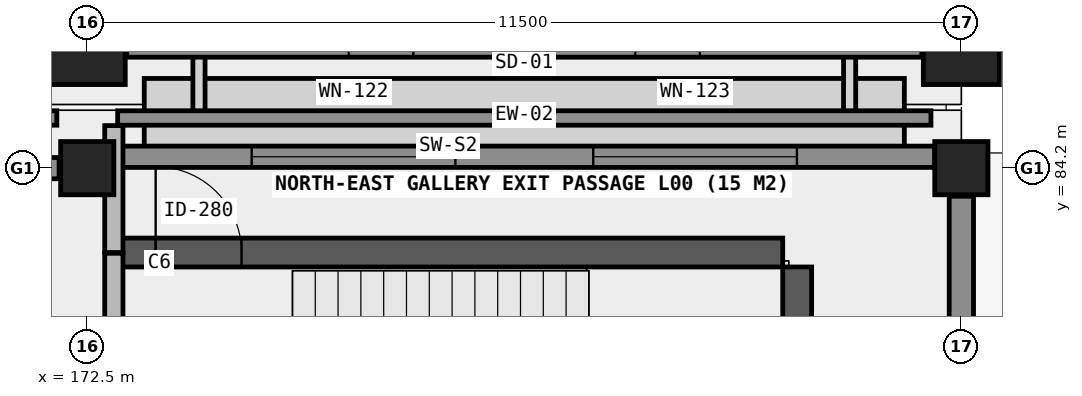
"""IFC4 building model, lengths in metres.
Left out: names, types, materials, properties, quantities, classifications, styles, units other than length and angle.
Written with IfcOpenShell. Run it as: python <this file> out.ifc"""

import sys

from ifc_helpers import new_model, si_unit, direction, frame, frame_2d, origin, origin_2d, place, context, subcontext, project, spatial, rectangle, extrude, element, fill, save


model = new_model("IFC4")
c1 = context("Model", 3, precision=1e-05, world=origin(), true_north=direction((0.0, 1.0)))
c2 = subcontext(c1, "Body", "Model", "MODEL_VIEW")
j1 = project(units=[si_unit("LENGTHUNIT", "METRE"), si_unit("PLANEANGLEUNIT", "RADIAN")], contexts=[c1])
p1 = place(None, origin())
s1 = spatial("IfcSite", under=j1, at=p1, CompositionType="ELEMENT")
p2 = place(p1, origin())
s2 = spatial("IfcBuilding", under=s1, at=p2, CompositionType="ELEMENT")
p3 = place(p2, origin())
s3 = spatial("IfcBuildingStorey", under=s2, at=p3, CompositionType="ELEMENT", Elevation=0.0)
p4 = place(p3, frame((172.5, 84.2, 0.0), z_axis=(0.0, 0.0, 1.0), x_axis=(1.0, 0.0, 0.0)))
e1 = element("IfcColumn", 1, at=p4, inside=s3, PredefinedType="COLUMN", context=c2, shape_type="SweptSolid", body=[
    extrude(rectangle(XDim=0.7, YDim=0.7, at=origin_2d()), origin(), (0.0, 0.0, 1.0), 4.2),
])
p5 = place(p3, frame((172.5, 85.8, 0.0), z_axis=(0.0, 0.0, 1.0), x_axis=(1.0, 0.0, 0.0)))
e2 = element("IfcColumn", 2, at=p5, inside=s3, PredefinedType="COLUMN", context=c2, shape_type="SweptSolid", body=[
    extrude(rectangle(XDim=1.0, YDim=1.0, at=origin_2d()), origin(), (0.0, 0.0, 1.0), 4.2),
])
p6 = place(p3, frame((184.0, 84.2, 0.0), z_axis=(0.0, 0.0, 1.0), x_axis=(1.0, 0.0, 0.0)))
e3 = element("IfcColumn", 3, at=p6, inside=s3, PredefinedType="COLUMN", context=c2, shape_type="SweptSolid", body=[
    extrude(rectangle(XDim=0.7, YDim=0.7, at=origin_2d()), origin(), (0.0, 0.0, 1.0), 4.2),
])
p7 = place(p3, frame((184.0, 85.8, 0.0), z_axis=(0.0, 0.0, 1.0), x_axis=(1.0, 0.0, 0.0)))
e4 = element("IfcColumn", 4, at=p7, inside=s3, PredefinedType="COLUMN", context=c2, shape_type="SweptSolid", body=[
    extrude(rectangle(XDim=1.0, YDim=1.0, at=origin_2d()), origin(), (0.0, 0.0, 1.0), 4.2),
])
p8 = place(p3, frame((172.85, 83.09, 0.0), z_axis=(0.0, 0.0, 1.0), x_axis=(1.0, 0.0, 0.0)))
e5 = element("IfcWall", 5, at=p8, inside=s3, PredefinedType="SHEAR", context=c2, shape_type="SweptSolid", body=[
    extrude(rectangle(XDim=8.8, YDim=0.38, at=frame_2d((4.4, 0.0))), origin(), (0.0, 0.0, 1.0), 4.2),
])
p9 = place(p8, frame((0.55, 0.0, 0.0)))
e6 = element("IfcOpeningElement", 6, at=p9, cuts=e5, PredefinedType="OPENING", context=c2, shape_type="SweptSolid", body=[
    extrude(rectangle(XDim=1.13, YDim=2.15, at=frame_2d((0.565, 1.075))), frame((0.0, 0.2, 0.0), z_axis=(0.0, -1.0, 0.0), x_axis=(1.0, 0.0, 0.0)), (0.0, 0.0, 1.0), 0.4),
])
p10 = place(p3, frame((181.84, 79.1, 0.0), z_axis=(0.0, 0.0, 1.0), x_axis=(0.0, 1.0, 0.0)))
e7 = element("IfcWall", 7, at=p10, inside=s3, PredefinedType="SHEAR", context=c2, shape_type="SweptSolid", body=[
    extrude(rectangle(XDim=3.8, YDim=0.38, at=frame_2d((1.9, 0.0))), origin(), (0.0, 0.0, 1.0), 4.2),
])
p11 = place(p3, frame((184.0, 78.395, 0.0), z_axis=(0.0, 0.0, 1.0), x_axis=(0.0, 1.0, 0.0)))
e8 = element("IfcWall", 8, at=p11, inside=s3, PredefinedType="SOLIDWALL", context=c2, shape_type="SweptSolid", body=[
    extrude(rectangle(XDim=5.435, YDim=0.32, at=frame_2d((2.718, 0.0))), origin(), (0.0, 0.0, 1.0), 3.2),
])
p12 = place(p11, frame((1.768, 0.0, 0.0)))
e9 = element("IfcOpeningElement", 9, at=p12, cuts=e8, PredefinedType="OPENING", context=c2, shape_type="SweptSolid", body=[
    extrude(rectangle(XDim=1.9, YDim=2.2, at=frame_2d((0.95, 1.1))), frame((0.0, 0.17, 0.0), z_axis=(0.0, -1.0, 0.0), x_axis=(1.0, 0.0, 0.0)), (0.0, 0.0, 1.0), 0.34),
])
for number, where, z_axis, x_axis in (
    (10, (161.4, 84.86, 0.0), (0.0, 0.0, 1.0), (1.0, 0.0, 0.0)),
    (11, (172.9, 84.86, 0.0), (0.0, 0.0, 1.0), (1.0, 0.0, 0.0)),
):
    element("IfcWall", number, at=place(p3, frame(where, z_axis=z_axis, x_axis=x_axis)), inside=s3, PredefinedType="PARAPET", context=c2, shape_type="SweptSolid", body=[
        extrude(rectangle(XDim=10.7, YDim=0.19, at=frame_2d((5.35, 0.0))), origin(), (0.0, 0.0, 1.0), 1.15),
    ])
p13 = place(p3, frame((161.37, 84.2, 0.0), z_axis=(0.0, 0.0, 1.0), x_axis=(1.0, 0.0, 0.0)))
e12 = element("IfcWall", 12, at=p13, inside=s3, PredefinedType="SOLIDWALL", context=c2, shape_type="SweptSolid", body=[
    extrude(rectangle(XDim=10.76, YDim=0.28, at=frame_2d((5.38, 0.0))), origin(), (0.0, 0.0, 1.0), 3.0),
])
p14 = place(p13, frame((2.173, 0.0, 0.85)))
e13 = element("IfcOpeningElement", 13, at=p14, cuts=e12, PredefinedType="OPENING", context=c2, shape_type="SweptSolid", body=[
    extrude(rectangle(XDim=2.12, YDim=2.08, at=frame_2d((1.06, 1.04))), frame((0.0, 0.15, 0.0), z_axis=(0.0, -1.0, 0.0), x_axis=(1.0, 0.0, 0.0)), (0.0, 0.0, 1.0), 0.3),
])
p15 = place(p13, frame((6.467, 0.0, 0.85)))
e14 = element("IfcOpeningElement", 14, at=p15, cuts=e12, PredefinedType="OPENING", context=c2, shape_type="SweptSolid", body=[
    extrude(rectangle(XDim=2.12, YDim=2.08, at=frame_2d((1.06, 1.04))), frame((0.0, 0.15, 0.0), z_axis=(0.0, -1.0, 0.0), x_axis=(1.0, 0.0, 0.0)), (0.0, 0.0, 1.0), 0.3),
])
p16 = place(p3, frame((172.85, 84.35, 0.0), z_axis=(0.0, 0.0, 1.0), x_axis=(1.0, 0.0, 0.0)))
e15 = element("IfcWall", 15, at=p16, inside=s3, PredefinedType="SOLIDWALL", context=c2, shape_type="SweptSolid", body=[
    extrude(rectangle(XDim=10.8, YDim=0.28, at=frame_2d((5.4, 0.0))), origin(), (0.0, 0.0, 1.0), 3.0),
])
p17 = place(p16, frame((1.813, 0.0, 0.82)))
e16 = element("IfcOpeningElement", 16, at=p17, cuts=e15, PredefinedType="OPENING", context=c2, shape_type="SweptSolid", body=[
    extrude(rectangle(XDim=2.68, YDim=2.12, at=frame_2d((1.34, 1.06))), frame((0.0, 0.15, 0.0), z_axis=(0.0, -1.0, 0.0), x_axis=(1.0, 0.0, 0.0)), (0.0, 0.0, 1.0), 0.3),
])
p18 = place(p16, frame((6.307, 0.0, 0.82)))
e17 = element("IfcOpeningElement", 17, at=p18, cuts=e15, PredefinedType="OPENING", context=c2, shape_type="SweptSolid", body=[
    extrude(rectangle(XDim=2.68, YDim=2.12, at=frame_2d((1.34, 1.06))), frame((0.0, 0.15, 0.0), z_axis=(0.0, -1.0, 0.0), x_axis=(1.0, 0.0, 0.0)), (0.0, 0.0, 1.0), 0.3),
])
p19 = place(p3, frame((173.02, 85.8, 0.0), z_axis=(0.0, 0.0, 1.0), x_axis=(1.0, 0.0, 0.0)))
e18 = element("IfcWall", 18, at=p19, inside=s3, PredefinedType="SOLIDWALL", context=c2, shape_type="SweptSolid", body=[
    extrude(rectangle(XDim=10.46, YDim=0.28, at=frame_2d((5.23, 0.0))), origin(), (0.0, 0.0, 1.0), 3.15),
])
p20 = place(p19, frame((2.92, 0.0, 1.25)))
e19 = element("IfcOpeningElement", 19, at=p20, cuts=e18, PredefinedType="OPENING", context=c2, shape_type="SweptSolid", body=[
    extrude(rectangle(XDim=0.85, YDim=0.95, at=frame_2d((0.425, 0.475))), frame((0.0, 0.15, 0.0), z_axis=(0.0, -1.0, 0.0), x_axis=(1.0, 0.0, 0.0)), (0.0, 0.0, 1.0), 0.3),
])
p21 = place(p19, frame((6.69, 0.0, 1.25)))
e20 = element("IfcOpeningElement", 20, at=p21, cuts=e18, PredefinedType="OPENING", context=c2, shape_type="SweptSolid", body=[
    extrude(rectangle(XDim=0.85, YDim=0.95, at=frame_2d((0.425, 0.475))), frame((0.0, 0.15, 0.0), z_axis=(0.0, -1.0, 0.0), x_axis=(1.0, 0.0, 0.0)), (0.0, 0.0, 1.0), 0.3),
])
p22 = place(p3, frame((172.85, 78.92, 0.0), z_axis=(0.0, 0.0, 1.0), x_axis=(0.0, 1.0, 0.0)))
e21 = element("IfcWall", 21, at=p22, inside=s3, PredefinedType="SOLIDWALL", context=c2, shape_type="SweptSolid", body=[
    extrude(rectangle(XDim=4.16, YDim=0.24, at=frame_2d((2.08, 0.0))), origin(), (0.0, 0.0, 1.0), 3.88),
])
p23 = place(p22, frame((1.3, 0.0, 0.0)))
e22 = element("IfcOpeningElement", 22, at=p23, cuts=e21, PredefinedType="OPENING", context=c2, shape_type="SweptSolid", body=[
    extrude(rectangle(XDim=1.13, YDim=2.15, at=frame_2d((0.565, 1.075))), frame((0.0, 0.13, 0.0), z_axis=(0.0, -1.0, 0.0), x_axis=(1.0, 0.0, 0.0)), (0.0, 0.0, 1.0), 0.26),
])
p24 = place(p3, frame((172.85, 83.09, 0.0), z_axis=(0.0, 0.0, 1.0), x_axis=(0.0, 1.0, 0.0)))
e23 = element("IfcWall", 23, at=p24, inside=s3, PredefinedType="SOLIDWALL", context=c2, shape_type="SweptSolid", body=[
    extrude(rectangle(XDim=1.67, YDim=0.24, at=frame_2d((0.835, 0.0))), origin(), (0.0, 0.0, 1.0), 3.88),
])
p25 = place(p17, origin())
e24 = element("IfcWindow", 24, at=p25, inside=s3, PartitioningType="SINGLE_PANEL", PredefinedType="WINDOW", context=c2, shape_type="SweptSolid", body=[
    extrude(rectangle(XDim=2.68, YDim=2.12, at=frame_2d((1.34, 1.06))), frame((0.0, 0.03, 0.0), z_axis=(0.0, -1.0, 0.0), x_axis=(1.0, 0.0, 0.0)), (0.0, 0.0, 1.0), 0.06),
])
fill(e16, e24)
p26 = place(p18, origin())
e25 = element("IfcWindow", 25, at=p26, inside=s3, PartitioningType="SINGLE_PANEL", PredefinedType="WINDOW", context=c2, shape_type="SweptSolid", body=[
    extrude(rectangle(XDim=2.68, YDim=2.12, at=frame_2d((1.34, 1.06))), frame((0.0, 0.03, 0.0), z_axis=(0.0, -1.0, 0.0), x_axis=(1.0, 0.0, 0.0)), (0.0, 0.0, 1.0), 0.06),
])
fill(e17, e25)
p27 = place(p9, origin())
e26 = element("IfcDoor", 26, at=p27, inside=s3, OperationType="SINGLE_SWING_LEFT", PredefinedType="DOOR", context=c2, shape_type="SweptSolid", body=[
    extrude(rectangle(XDim=1.13, YDim=2.15, at=frame_2d((0.565, 1.075))), frame((0.0, 0.025, 0.0), z_axis=(0.0, -1.0, 0.0), x_axis=(1.0, 0.0, 0.0)), (0.0, 0.0, 1.0), 0.05),
])
fill(e6, e26)
save(model, sys.argv[1])
